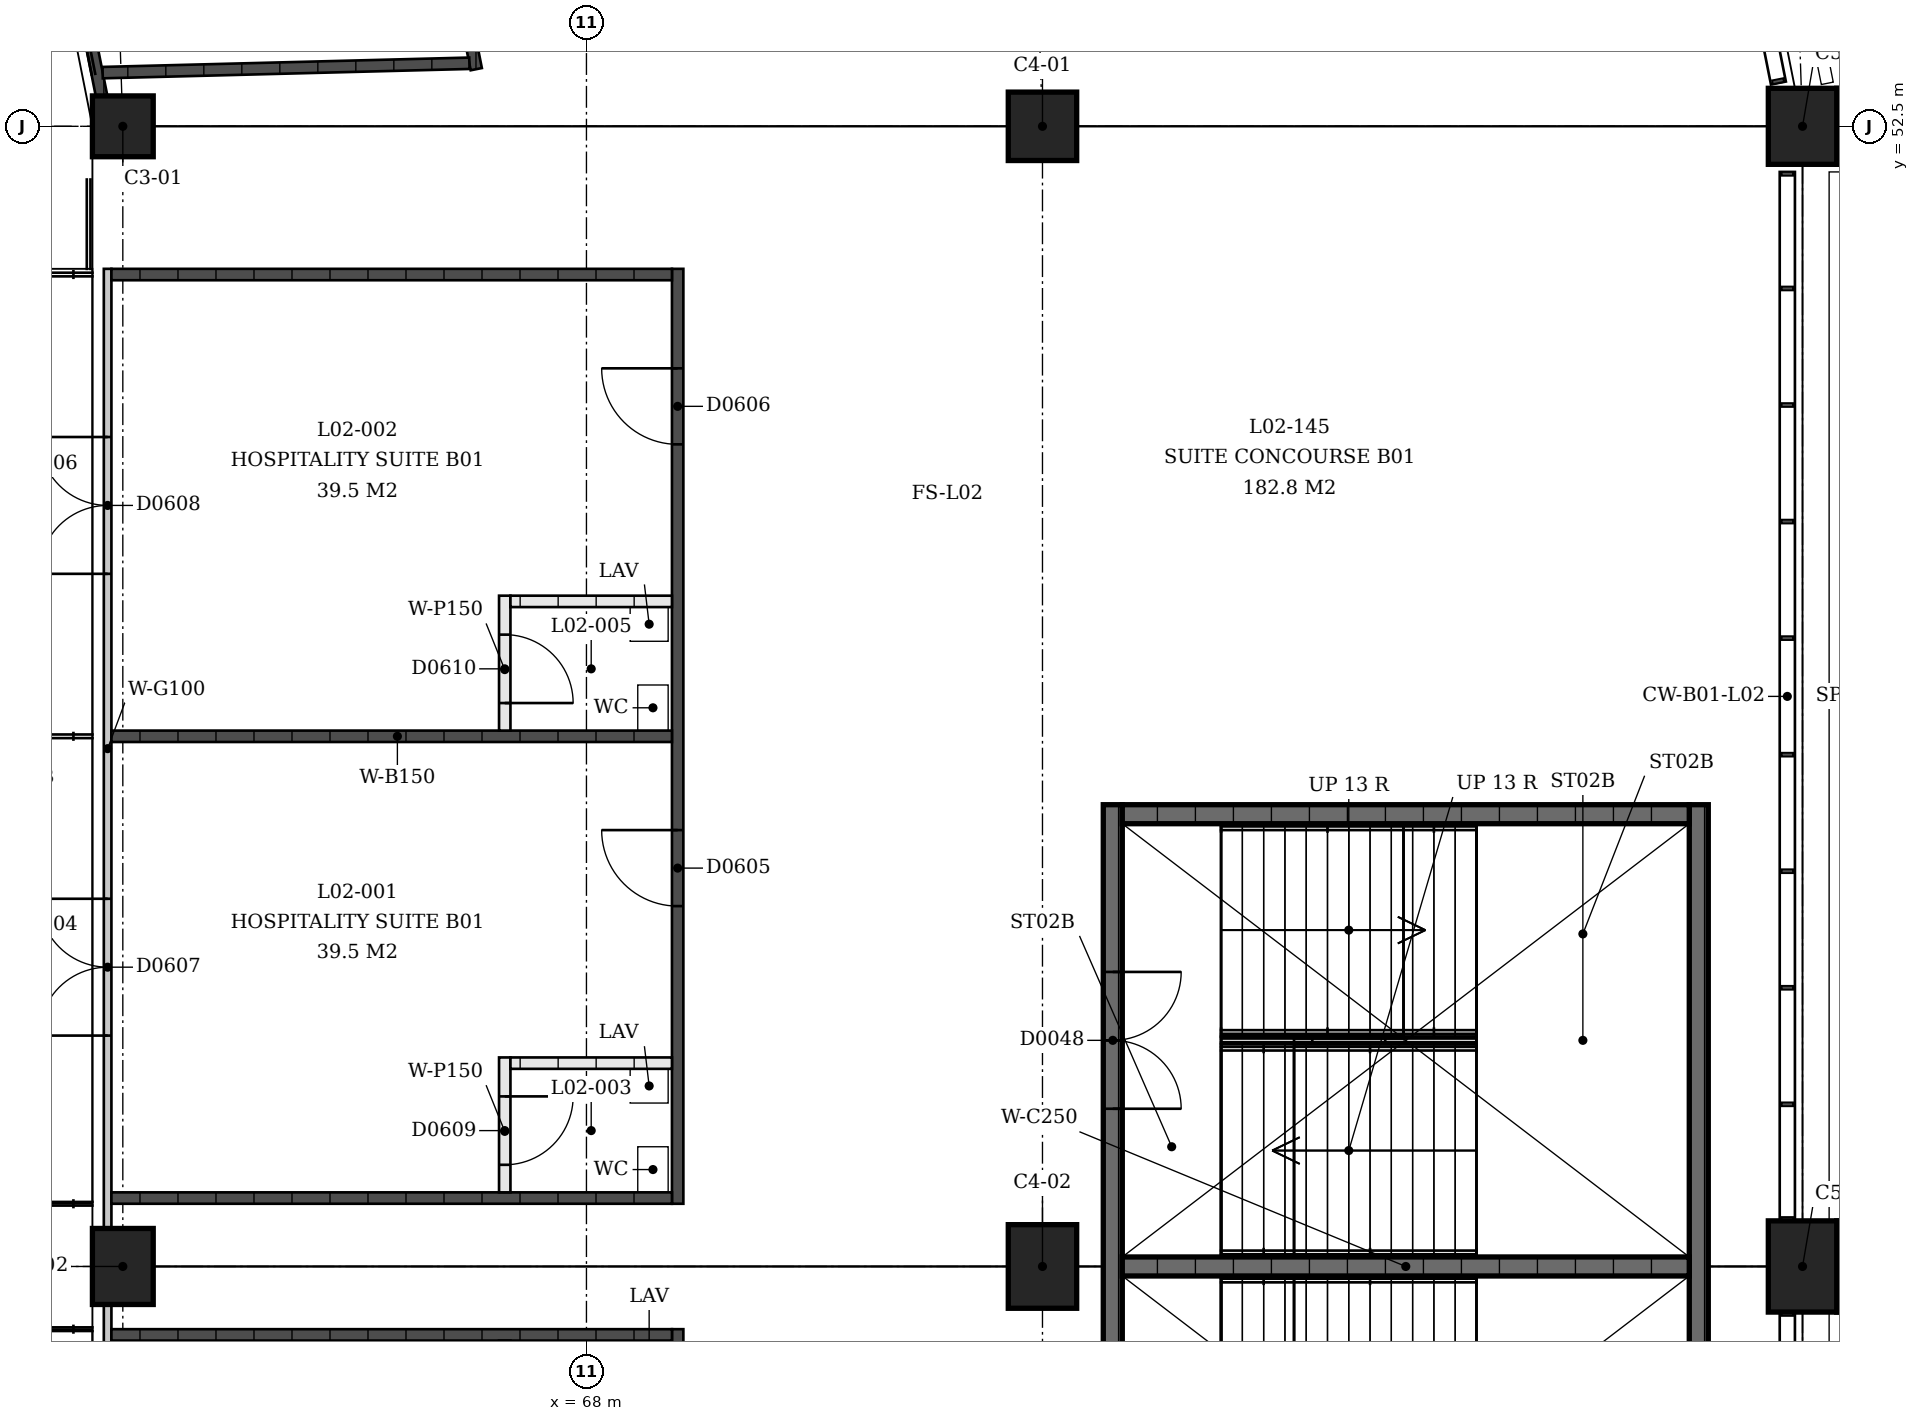
"""IFC4 building model, lengths in metres.
Left out: names, types, materials, properties, quantities, classifications, styles, units other than length and angle.
Written with IfcOpenShell. Run it as: python <this file> out.ifc"""

import sys

from ifc_helpers import new_model, si_unit, direction, frame, frame_2d, origin, origin_2d, place, context, subcontext, project, spatial, rectangle, extrude, element, fill, save


model = new_model("IFC4")
c1 = context("Model", 3, precision=1e-05, world=origin(), true_north=direction((0.0, 1.0)))
c2 = subcontext(c1, "Body", "Model", "MODEL_VIEW")
j1 = project(units=[si_unit("LENGTHUNIT", "METRE"), si_unit("PLANEANGLEUNIT", "RADIAN")], contexts=[c1])
p1 = place(None, origin())
s1 = spatial("IfcSite", under=j1, at=p1, CompositionType="ELEMENT")
p2 = place(p1, origin())
s2 = spatial("IfcBuilding", under=s1, at=p2, CompositionType="ELEMENT")
p3 = place(p2, frame((0.0, 0.0, 9.0)))
s3 = spatial("IfcBuildingStorey", under=s2, at=p3, CompositionType="ELEMENT", Elevation=9.0)
p4 = place(p3, frame((61.9, 52.5, 0.0), z_axis=(0.0, 0.0, 1.0), x_axis=(0.0, 1.0, 0.0)))
e1 = element("IfcColumn", 1, at=p4, inside=s3, PredefinedType="COLUMN", context=c2, shape_type="SweptSolid", body=[
    extrude(rectangle(XDim=0.8, YDim=0.8, at=origin_2d()), origin(), (0.0, 0.0, 1.0), 4.5),
])
p5 = place(p3, frame((74.0, 52.5, 0.0), z_axis=(0.0, 0.0, 1.0), x_axis=(0.0, 1.0, 0.0)))
e2 = element("IfcColumn", 2, at=p5, inside=s3, PredefinedType="COLUMN", context=c2, shape_type="SweptSolid", body=[
    extrude(rectangle(XDim=0.9, YDim=0.9, at=origin_2d()), origin(), (0.0, 0.0, 1.0), 4.5),
])
p6 = place(p3, frame((84.0, 52.5, 0.0), z_axis=(0.0, 0.0, 1.0), x_axis=(0.0, 1.0, 0.0)))
e3 = element("IfcColumn", 3, at=p6, inside=s3, PredefinedType="COLUMN", context=c2, shape_type="SweptSolid", body=[
    extrude(rectangle(XDim=1.0, YDim=0.9, at=origin_2d()), origin(), (0.0, 0.0, 1.0), 4.5),
])
p7 = place(p3, frame((61.9, 37.5, 0.0), z_axis=(0.0, 0.0, 1.0), x_axis=(0.0, 1.0, 0.0)))
e4 = element("IfcColumn", 4, at=p7, inside=s3, PredefinedType="COLUMN", context=c2, shape_type="SweptSolid", body=[
    extrude(rectangle(XDim=1.0, YDim=0.8, at=origin_2d()), origin(), (0.0, 0.0, 1.0), 4.5),
])
p8 = place(p3, frame((74.0, 37.5, 0.0), z_axis=(0.0, 0.0, 1.0), x_axis=(0.0, 1.0, 0.0)))
e5 = element("IfcColumn", 5, at=p8, inside=s3, PredefinedType="COLUMN", context=c2, shape_type="SweptSolid", body=[
    extrude(rectangle(XDim=1.1, YDim=0.9, at=origin_2d()), origin(), (0.0, 0.0, 1.0), 4.5),
])
p9 = place(p3, frame((84.0, 37.5, 0.0), z_axis=(0.0, 0.0, 1.0), x_axis=(0.0, 1.0, 0.0)))
e6 = element("IfcColumn", 6, at=p9, inside=s3, PredefinedType="COLUMN", context=c2, shape_type="SweptSolid", body=[
    extrude(rectangle(XDim=1.2, YDim=0.9, at=origin_2d()), origin(), (0.0, 0.0, 1.0), 4.5),
])
p10 = place(p3, frame((74.925, 31.425, 0.0), z_axis=(0.0, 0.0, 1.0), x_axis=(0.0, 1.0, 0.0)))
e7 = element("IfcWall", 7, at=p10, inside=s3, PredefinedType="SHEAR", context=c2, shape_type="SweptSolid", body=[
    extrude(rectangle(XDim=12.15, YDim=0.25, at=frame_2d((6.075, 0.0))), origin(), (0.0, 0.0, 1.0), 4.09),
])
p11 = place(p10, frame((2.2, 0.0, 0.0)))
e8 = element("IfcOpeningElement", 8, at=p11, cuts=e7, PredefinedType="OPENING", context=c2, shape_type="SweptSolid", body=[
    extrude(rectangle(XDim=1.8, YDim=2.1, at=frame_2d((0.9, 1.05))), frame((0.0, 0.125, 0.0), z_axis=(0.0, -1.0, 0.0), x_axis=(1.0, 0.0, 0.0)), (0.0, 0.0, 1.0), 0.25),
])
p12 = place(p10, frame((8.15, 0.0, 0.0)))
e9 = element("IfcOpeningElement", 9, at=p12, cuts=e7, PredefinedType="OPENING", context=c2, shape_type="SweptSolid", body=[
    extrude(rectangle(XDim=1.8, YDim=2.1, at=frame_2d((0.9, 1.05))), frame((0.0, 0.125, 0.0), z_axis=(0.0, -1.0, 0.0), x_axis=(1.0, 0.0, 0.0)), (0.0, 0.0, 1.0), 0.25),
])
p13 = place(p3, frame((82.635, 31.425, 0.0), z_axis=(0.0, 0.0, 1.0), x_axis=(0.0, 1.0, 0.0)))
e10 = element("IfcWall", 10, at=p13, inside=s3, PredefinedType="SHEAR", context=c2, shape_type="SweptSolid", body=[
    extrude(rectangle(XDim=12.15, YDim=0.25, at=frame_2d((6.075, 0.0))), origin(), (0.0, 0.0, 1.0), 4.09),
])
for number, where, z_axis, x_axis in (
    (11, (75.05, 43.45, 0.0), (0.0, 0.0, 1.0), (1.0, 0.0, 0.0)),
    (12, (75.05, 37.5, 0.0), (0.0, 0.0, 1.0), (1.0, 0.0, 0.0)),
):
    element("IfcWall", number, at=place(p3, frame(where, z_axis=z_axis, x_axis=x_axis)), inside=s3, PredefinedType="SHEAR", context=c2, shape_type="SweptSolid", body=[
        extrude(rectangle(XDim=7.46, YDim=0.25, at=frame_2d((3.73, 0.0))), origin(), (0.0, 0.0, 1.0), 4.09),
    ])
p14 = place(p3, frame((61.7, 38.0, 0.0), z_axis=(0.0, 0.0, 1.0), x_axis=(0.0, 1.0, 0.0)))
e13 = element("IfcWall", 13, at=p14, inside=s3, PredefinedType="PARTITIONING", context=c2, shape_type="SweptSolid", body=[
    extrude(rectangle(XDim=12.625, YDim=0.1, at=frame_2d((6.312, 0.0))), origin(), (0.0, 0.0, 1.0), 3.0),
])
p15 = place(p14, frame((2.538, 0.0, 0.0)))
e14 = element("IfcOpeningElement", 14, at=p15, cuts=e13, PredefinedType="OPENING", context=c2, shape_type="SweptSolid", body=[
    extrude(rectangle(XDim=1.8, YDim=2.1, at=frame_2d((0.9, 1.05))), frame((0.0, 0.05, 0.0), z_axis=(0.0, -1.0, 0.0), x_axis=(1.0, 0.0, 0.0)), (0.0, 0.0, 1.0), 0.1),
])
p16 = place(p14, frame((8.613, 0.0, 0.0)))
e15 = element("IfcOpeningElement", 15, at=p16, cuts=e13, PredefinedType="OPENING", context=c2, shape_type="SweptSolid", body=[
    extrude(rectangle(XDim=1.8, YDim=2.1, at=frame_2d((0.9, 1.05))), frame((0.0, 0.05, 0.0), z_axis=(0.0, -1.0, 0.0), x_axis=(1.0, 0.0, 0.0)), (0.0, 0.0, 1.0), 0.1),
])
p17 = place(p3, frame((69.2, 38.325, 0.0), z_axis=(0.0, 0.0, 1.0), x_axis=(0.0, 1.0, 0.0)))
e16 = element("IfcWall", 16, at=p17, inside=s3, PredefinedType="SOLIDWALL", context=c2, shape_type="SweptSolid", body=[
    extrude(rectangle(XDim=12.3, YDim=0.15, at=frame_2d((6.15, 0.0))), origin(), (0.0, 0.0, 1.0), 3.0),
])
p18 = place(p17, frame((3.916, 0.0, 0.0)))
e17 = element("IfcOpeningElement", 17, at=p18, cuts=e16, PredefinedType="OPENING", context=c2, shape_type="SweptSolid", body=[
    extrude(rectangle(XDim=1.0, YDim=2.1, at=frame_2d((0.5, 1.05))), frame((0.0, 0.075, 0.0), z_axis=(0.0, -1.0, 0.0), x_axis=(1.0, 0.0, 0.0)), (0.0, 0.0, 1.0), 0.15),
])
p19 = place(p17, frame((9.991, 0.0, 0.0)))
e18 = element("IfcOpeningElement", 18, at=p19, cuts=e16, PredefinedType="OPENING", context=c2, shape_type="SweptSolid", body=[
    extrude(rectangle(XDim=1.0, YDim=2.1, at=frame_2d((0.5, 1.05))), frame((0.0, 0.075, 0.0), z_axis=(0.0, -1.0, 0.0), x_axis=(1.0, 0.0, 0.0)), (0.0, 0.0, 1.0), 0.15),
])
for number, where, z_axis, x_axis in (
    (19, (61.75, 38.4, 0.0), (0.0, 0.0, 1.0), (1.0, 0.0, 0.0)),
    (20, (61.75, 44.475, 0.0), (0.0, 0.0, 1.0), (1.0, 0.0, 0.0)),
    (21, (61.75, 50.55, 0.0), (0.0, 0.0, 1.0), (1.0, 0.0, 0.0)),
):
    element("IfcWall", number, at=place(p3, frame(where, z_axis=z_axis, x_axis=x_axis)), inside=s3, PredefinedType="SOLIDWALL", context=c2, shape_type="SweptSolid", body=[
        extrude(rectangle(XDim=7.375, YDim=0.15, at=frame_2d((3.688, 0.0))), origin(), (0.0, 0.0, 1.0), 3.0),
    ])
p20 = place(p3, frame((66.925, 38.475, 0.0), z_axis=(0.0, 0.0, 1.0), x_axis=(0.0, 1.0, 0.0)))
e22 = element("IfcWall", 22, at=p20, inside=s3, PredefinedType="PARTITIONING", context=c2, shape_type="SweptSolid", body=[
    extrude(rectangle(XDim=1.775, YDim=0.15, at=frame_2d((0.887, 0.0))), origin(), (0.0, 0.0, 1.0), 3.0),
])
p21 = place(p20, frame((0.363, 0.0, 0.0)))
e23 = element("IfcOpeningElement", 23, at=p21, cuts=e22, PredefinedType="OPENING", context=c2, shape_type="SweptSolid", body=[
    extrude(rectangle(XDim=0.9, YDim=2.1, at=frame_2d((0.45, 1.05))), frame((0.0, 0.075, 0.0), z_axis=(0.0, -1.0, 0.0), x_axis=(1.0, 0.0, 0.0)), (0.0, 0.0, 1.0), 0.15),
])
p22 = place(p3, frame((67.0, 40.175, 0.0), z_axis=(0.0, 0.0, 1.0), x_axis=(1.0, 0.0, 0.0)))
e24 = element("IfcWall", 24, at=p22, inside=s3, PredefinedType="PARTITIONING", context=c2, shape_type="SweptSolid", body=[
    extrude(rectangle(XDim=2.125, YDim=0.15, at=frame_2d((1.062, 0.0))), origin(), (0.0, 0.0, 1.0), 3.0),
])
p23 = place(p3, frame((66.925, 44.55, 0.0), z_axis=(0.0, 0.0, 1.0), x_axis=(0.0, 1.0, 0.0)))
e25 = element("IfcWall", 25, at=p23, inside=s3, PredefinedType="PARTITIONING", context=c2, shape_type="SweptSolid", body=[
    extrude(rectangle(XDim=1.775, YDim=0.15, at=frame_2d((0.887, 0.0))), origin(), (0.0, 0.0, 1.0), 3.0),
])
p24 = place(p23, frame((0.363, 0.0, 0.0)))
e26 = element("IfcOpeningElement", 26, at=p24, cuts=e25, PredefinedType="OPENING", context=c2, shape_type="SweptSolid", body=[
    extrude(rectangle(XDim=0.9, YDim=2.1, at=frame_2d((0.45, 1.05))), frame((0.0, 0.075, 0.0), z_axis=(0.0, -1.0, 0.0), x_axis=(1.0, 0.0, 0.0)), (0.0, 0.0, 1.0), 0.15),
])
p25 = place(p3, frame((67.0, 46.25, 0.0), z_axis=(0.0, 0.0, 1.0), x_axis=(1.0, 0.0, 0.0)))
e27 = element("IfcWall", 27, at=p25, inside=s3, PredefinedType="PARTITIONING", context=c2, shape_type="SweptSolid", body=[
    extrude(rectangle(XDim=2.125, YDim=0.15, at=frame_2d((1.062, 0.0))), origin(), (0.0, 0.0, 1.0), 3.0),
])
p26 = place(p3, frame((61.7, 37.0, 0.0), z_axis=(0.0, 0.0, 1.0), x_axis=(0.0, -1.0, 0.0)))
e28 = element("IfcWall", 28, at=p26, inside=s3, PredefinedType="PARTITIONING", context=c2, shape_type="SweptSolid", body=[
    extrude(rectangle(XDim=12.625, YDim=0.1, at=frame_2d((6.312, 0.0))), origin(), (0.0, 0.0, 1.0), 3.0),
])
p27 = place(p26, frame((2.538, 0.0, 0.0)))
e29 = element("IfcOpeningElement", 29, at=p27, cuts=e28, PredefinedType="OPENING", context=c2, shape_type="SweptSolid", body=[
    extrude(rectangle(XDim=1.8, YDim=2.1, at=frame_2d((0.9, 1.05))), frame((0.0, 0.05, 0.0), z_axis=(0.0, -1.0, 0.0), x_axis=(1.0, 0.0, 0.0)), (0.0, 0.0, 1.0), 0.1),
])
p28 = place(p26, frame((8.613, 0.0, 0.0)))
e30 = element("IfcOpeningElement", 30, at=p28, cuts=e28, PredefinedType="OPENING", context=c2, shape_type="SweptSolid", body=[
    extrude(rectangle(XDim=1.8, YDim=2.1, at=frame_2d((0.9, 1.05))), frame((0.0, 0.05, 0.0), z_axis=(0.0, -1.0, 0.0), x_axis=(1.0, 0.0, 0.0)), (0.0, 0.0, 1.0), 0.1),
])
p29 = place(p3, frame((69.2, 36.675, 0.0), z_axis=(0.0, 0.0, 1.0), x_axis=(0.0, -1.0, 0.0)))
e31 = element("IfcWall", 31, at=p29, inside=s3, PredefinedType="SOLIDWALL", context=c2, shape_type="SweptSolid", body=[
    extrude(rectangle(XDim=12.3, YDim=0.15, at=frame_2d((6.15, 0.0))), origin(), (0.0, 0.0, 1.0), 3.0),
])
p30 = place(p29, frame((3.916, 0.0, 0.0)))
e32 = element("IfcOpeningElement", 32, at=p30, cuts=e31, PredefinedType="OPENING", context=c2, shape_type="SweptSolid", body=[
    extrude(rectangle(XDim=1.0, YDim=2.1, at=frame_2d((0.5, 1.05))), frame((0.0, 0.075, 0.0), z_axis=(0.0, -1.0, 0.0), x_axis=(1.0, 0.0, 0.0)), (0.0, 0.0, 1.0), 0.15),
])
p31 = place(p29, frame((9.991, 0.0, 0.0)))
e33 = element("IfcOpeningElement", 33, at=p31, cuts=e31, PredefinedType="OPENING", context=c2, shape_type="SweptSolid", body=[
    extrude(rectangle(XDim=1.0, YDim=2.1, at=frame_2d((0.5, 1.05))), frame((0.0, 0.075, 0.0), z_axis=(0.0, -1.0, 0.0), x_axis=(1.0, 0.0, 0.0)), (0.0, 0.0, 1.0), 0.15),
])
p32 = place(p3, frame((61.75, 36.6, 0.0), z_axis=(0.0, 0.0, 1.0), x_axis=(1.0, 0.0, 0.0)))
e34 = element("IfcWall", 34, at=p32, inside=s3, PredefinedType="SOLIDWALL", context=c2, shape_type="SweptSolid", body=[
    extrude(rectangle(XDim=7.375, YDim=0.15, at=frame_2d((3.688, 0.0))), origin(), (0.0, 0.0, 1.0), 3.0),
])
p33 = place(p3, frame((66.925, 36.525, 0.0), z_axis=(0.0, 0.0, 1.0), x_axis=(0.0, -1.0, 0.0)))
e35 = element("IfcWall", 35, at=p33, inside=s3, PredefinedType="PARTITIONING", context=c2, shape_type="SweptSolid", body=[
    extrude(rectangle(XDim=1.775, YDim=0.15, at=frame_2d((0.887, 0.0))), origin(), (0.0, 0.0, 1.0), 3.0),
])
p34 = place(p33, frame((0.363, 0.0, 0.0)))
e36 = element("IfcOpeningElement", 36, at=p34, cuts=e35, PredefinedType="OPENING", context=c2, shape_type="SweptSolid", body=[
    extrude(rectangle(XDim=0.9, YDim=2.1, at=frame_2d((0.45, 1.05))), frame((0.0, 0.075, 0.0), z_axis=(0.0, -1.0, 0.0), x_axis=(1.0, 0.0, 0.0)), (0.0, 0.0, 1.0), 0.15),
])
p35 = place(p3, frame((59.681, 62.65, 0.0), z_axis=(0.0, 0.0, 1.0), x_axis=(0.195086492048, -0.980786042223, 0.0)))
e37 = element("IfcWall", 37, at=p35, inside=s3, PredefinedType="SOLIDWALL", context=c2, shape_type="SweptSolid", body=[
    extrude(rectangle(XDim=9.941, YDim=0.15, at=frame_2d((4.971, 0.0))), origin(), (0.0, 0.0, 1.0), 3.0),
])
p36 = place(p3, frame((64.385, 64.138, 0.0), z_axis=(0.0, 0.0, 1.0), x_axis=(0.195083899224, -0.980786557954, 0.0)))
e38 = element("IfcWall", 38, at=p36, inside=s3, PredefinedType="SOLIDWALL", context=c2, shape_type="SweptSolid", body=[
    extrude(rectangle(XDim=11.099, YDim=0.15, at=frame_2d((5.55, 0.0))), origin(), (0.0, 0.0, 1.0), 3.0),
])
p37 = place(p36, frame((2.315, 0.0, 0.0)))
e39 = element("IfcOpeningElement", 39, at=p37, cuts=e38, PredefinedType="OPENING", context=c2, shape_type="SweptSolid", body=[
    extrude(rectangle(XDim=1.0, YDim=2.1, at=frame_2d((0.5, 1.05))), frame((0.0, 0.075, 0.0), z_axis=(0.0, -1.0, 0.0), x_axis=(1.0, 0.0, 0.0)), (0.0, 0.0, 1.0), 0.15),
])
p38 = place(p36, frame((7.784, 0.0, 0.0)))
e40 = element("IfcOpeningElement", 40, at=p38, cuts=e38, PredefinedType="OPENING", context=c2, shape_type="SweptSolid", body=[
    extrude(rectangle(XDim=1.0, YDim=2.1, at=frame_2d((0.5, 1.05))), frame((0.0, 0.075, 0.0), z_axis=(0.0, -1.0, 0.0), x_axis=(1.0, 0.0, 0.0)), (0.0, 0.0, 1.0), 0.15),
])
p39 = place(p3, frame((61.635, 53.206, 0.0), z_axis=(0.0, 0.0, 1.0), x_axis=(0.999673752981, 0.025541879345, 0.0)))
e41 = element("IfcWall", 41, at=p39, inside=s3, PredefinedType="SOLIDWALL", context=c2, shape_type="SweptSolid", body=[
    extrude(rectangle(XDim=4.827, YDim=0.15, at=frame_2d((2.414, 0.0))), origin(), (0.0, 0.0, 1.0), 3.0),
])
p40 = place(p12, origin())
e42 = element("IfcDoor", 42, at=p40, inside=s3, OperationType="DOUBLE_DOOR_SINGLE_SWING", PredefinedType="DOOR", context=c2, shape_type="SweptSolid", body=[
    extrude(rectangle(XDim=1.8, YDim=2.1, at=frame_2d((0.9, 1.05))), frame((0.0, 0.025, 0.0), z_axis=(0.0, -1.0, 0.0), x_axis=(1.0, 0.0, 0.0)), (0.0, 0.0, 1.0), 0.05),
])
fill(e9, e42)
p41 = place(p18, origin())
e43 = element("IfcDoor", 43, at=p41, inside=s3, OperationType="SINGLE_SWING_LEFT", PredefinedType="DOOR", context=c2, shape_type="SweptSolid", body=[
    extrude(rectangle(XDim=1.0, YDim=2.1, at=frame_2d((0.5, 1.05))), frame((0.0, 0.025, 0.0), z_axis=(0.0, -1.0, 0.0), x_axis=(1.0, 0.0, 0.0)), (0.0, 0.0, 1.0), 0.05),
])
fill(e17, e43)
p42 = place(p19, origin())
e44 = element("IfcDoor", 44, at=p42, inside=s3, OperationType="SINGLE_SWING_LEFT", PredefinedType="DOOR", context=c2, shape_type="SweptSolid", body=[
    extrude(rectangle(XDim=1.0, YDim=2.1, at=frame_2d((0.5, 1.05))), frame((0.0, 0.025, 0.0), z_axis=(0.0, -1.0, 0.0), x_axis=(1.0, 0.0, 0.0)), (0.0, 0.0, 1.0), 0.05),
])
fill(e18, e44)
p43 = place(p15, origin())
e45 = element("IfcDoor", 45, at=p43, inside=s3, OperationType="DOUBLE_DOOR_SINGLE_SWING", PredefinedType="DOOR", context=c2, shape_type="SweptSolid", body=[
    extrude(rectangle(XDim=1.8, YDim=2.1, at=frame_2d((0.9, 1.05))), frame((0.0, 0.025, 0.0), z_axis=(0.0, -1.0, 0.0), x_axis=(1.0, 0.0, 0.0)), (0.0, 0.0, 1.0), 0.05),
])
fill(e14, e45)
p44 = place(p16, origin())
e46 = element("IfcDoor", 46, at=p44, inside=s3, OperationType="DOUBLE_DOOR_SINGLE_SWING", PredefinedType="DOOR", context=c2, shape_type="SweptSolid", body=[
    extrude(rectangle(XDim=1.8, YDim=2.1, at=frame_2d((0.9, 1.05))), frame((0.0, 0.025, 0.0), z_axis=(0.0, -1.0, 0.0), x_axis=(1.0, 0.0, 0.0)), (0.0, 0.0, 1.0), 0.05),
])
fill(e15, e46)
p45 = place(p21, origin())
e47 = element("IfcDoor", 47, at=p45, inside=s3, OperationType="SINGLE_SWING_RIGHT", PredefinedType="DOOR", context=c2, shape_type="SweptSolid", body=[
    extrude(rectangle(XDim=0.9, YDim=2.1, at=frame_2d((0.45, 1.05))), frame((0.0, 0.025, 0.0), z_axis=(0.0, -1.0, 0.0), x_axis=(1.0, 0.0, 0.0)), (0.0, 0.0, 1.0), 0.05),
])
fill(e23, e47)
p46 = place(p24, origin())
e48 = element("IfcDoor", 48, at=p46, inside=s3, OperationType="SINGLE_SWING_LEFT", PredefinedType="DOOR", context=c2, shape_type="SweptSolid", body=[
    extrude(rectangle(XDim=0.9, YDim=2.1, at=frame_2d((0.45, 1.05))), frame((0.0, 0.025, 0.0), z_axis=(0.0, -1.0, 0.0), x_axis=(1.0, 0.0, 0.0)), (0.0, 0.0, 1.0), 0.05),
])
fill(e26, e48)
save(model, sys.argv[1])
